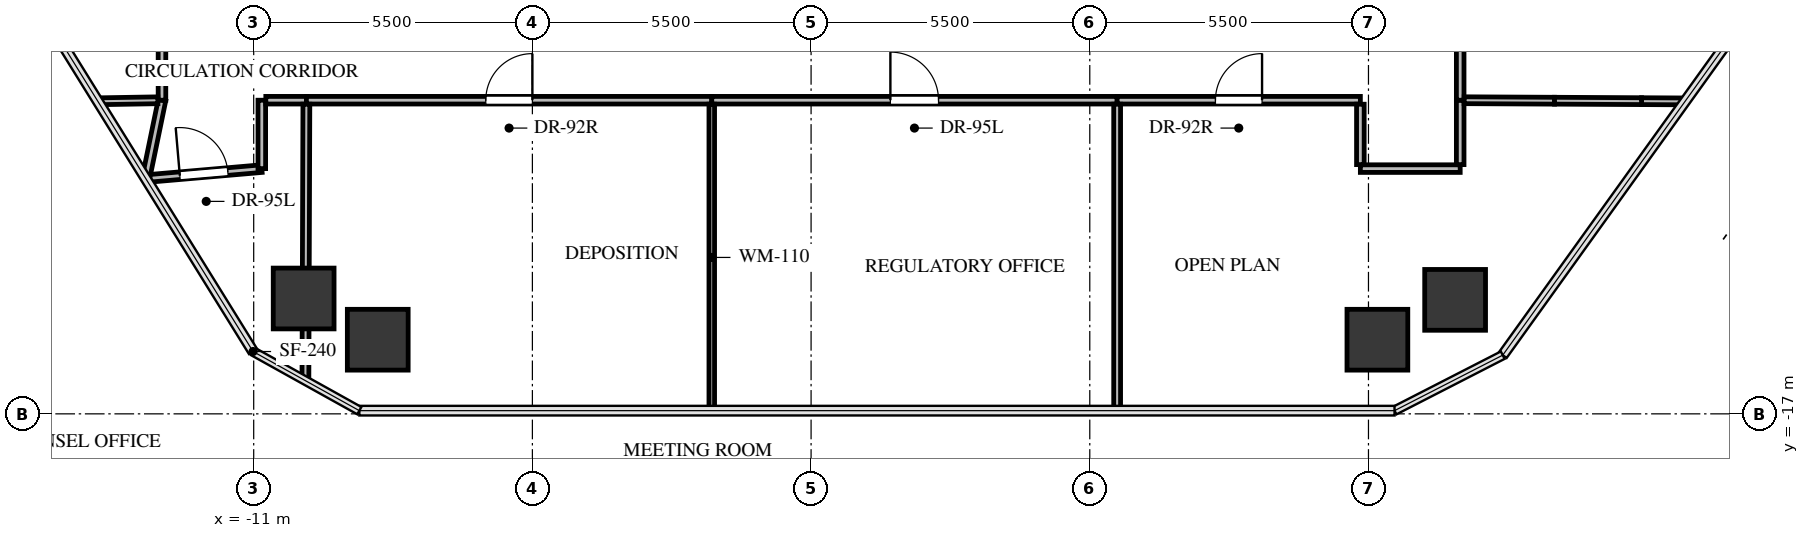
"""IFC4 building model, lengths in metres.
Left out: names, types, materials, properties, quantities, classifications, styles, units other than length and angle.
Written with IfcOpenShell. Run it as: python <this file> out.ifc"""

import sys

from ifc_helpers import new_model, si_unit, direction, frame, frame_2d, origin, origin_2d, place, context, subcontext, project, spatial, rectangle, extrude, source, transform, mapped, element, fill, save


model = new_model("IFC4")
c1 = context("Model", 3, precision=1e-05, world=origin(), true_north=direction((0.0, 1.0)))
c2 = subcontext(c1, "Body", "Model", "MODEL_VIEW")
j1 = project(units=[si_unit("LENGTHUNIT", "METRE"), si_unit("PLANEANGLEUNIT", "RADIAN")], contexts=[c1])
p1 = place(None, origin())
s1 = spatial("IfcSite", under=j1, at=p1, CompositionType="ELEMENT")
p2 = place(p1, origin())
s2 = spatial("IfcBuilding", under=s1, at=p2, CompositionType="ELEMENT")
p3 = place(p2, frame((0.0, 0.0, 146.1)))
s3 = spatial("IfcBuildingStorey", under=s2, at=p3, CompositionType="ELEMENT", Elevation=146.1)
m1 = source(origin(), c2, "Body", "SweptSolid", [
    extrude(rectangle(XDim=1.2, YDim=1.2, at=origin_2d()), origin(), (0.0, 0.0, 1.0), 4.12),
])
for number, where, z_axis, x_axis in (
    (1, (-10.014, -14.723, -0.24), (0.0, 0.0, 1.0), (1.0, 0.0, 0.0)),
    (2, (12.71, -14.75, -0.24), (0.0, 0.0, 1.0), (1.0, 0.0, 0.0)),
    (3, (11.176, -15.537, -0.24), (0.0, 0.0, 1.0), (1.0, 0.0, 0.0)),
    (4, (-8.552, -15.537, -0.24), (0.0, 0.0, 1.0), (1.0, 0.0, 0.0)),
):
    element("IfcColumn", number, at=place(p3, frame(where, z_axis=z_axis, x_axis=x_axis)), inside=s3, PredefinedType="COLUMN", context=c2, shape_type="MappedRepresentation", body=[
        mapped(m1, transform((0.0, 0.0, 0.0), x_axis=(1.0, 0.0, 0.0), y_axis=(0.0, 1.0, 0.0), z_axis=(0.0, 0.0, 1.0), scale=1.0)),
    ])
p4 = place(p3, frame((-13.129, -12.358, 0.0), z_axis=(0.0, 0.0, 1.0), x_axis=(0.996279168698, 0.086184789953, 0.0)))
e5 = element("IfcWall", 5, at=p4, inside=s3, PredefinedType="PARTITIONING", context=c2, shape_type="SweptSolid", body=[
    extrude(rectangle(XDim=2.297, YDim=0.15, at=frame_2d((1.149, 0.0))), origin(), (0.0, 0.0, 1.0), 2.3),
])
p5 = place(p4, frame((0.674, 0.0, 0.0)))
e6 = element("IfcOpeningElement", 6, at=p5, cuts=e5, PredefinedType="OPENING", context=c2, shape_type="SweptSolid", body=[
    extrude(rectangle(XDim=0.95, YDim=2.1, at=frame_2d((0.475, 1.05))), frame((0.0, 0.085, 0.0), z_axis=(0.0, -1.0, 0.0), x_axis=(1.0, 0.0, 0.0)), (0.0, 0.0, 1.0), 0.17),
])
p6 = place(p3, frame((-12.81, -10.81, 0.0), z_axis=(0.0, 0.0, 1.0), x_axis=(-0.201786289638, -0.979429575474, 0.0)))
e7 = element("IfcWall", 7, at=p6, inside=s3, PredefinedType="PARTITIONING", context=c2, shape_type="SweptSolid", body=[
    extrude(rectangle(XDim=1.498, YDim=0.15, at=frame_2d((0.749, 0.0))), origin(), (0.0, 0.0, 1.0), 2.3),
])
p7 = place(p3, frame((-10.84, -12.16, 0.0), z_axis=(0.0, 0.0, 1.0), x_axis=(0.0, 1.0, 0.0)))
e8 = element("IfcWall", 8, at=p7, inside=s3, PredefinedType="PARTITIONING", context=c2, shape_type="SweptSolid", body=[
    extrude(rectangle(XDim=1.35, YDim=0.15, at=frame_2d((0.675, 0.0))), origin(), (0.0, 0.0, 1.0), 3.865),
])
p8 = place(p3, frame((-10.761, -10.81, 0.0), z_axis=(0.0, 0.0, 1.0), x_axis=(1.0, 0.0, 0.0)))
e9 = element("IfcWall", 9, at=p8, inside=s3, PredefinedType="PARTITIONING", context=c2, shape_type="SweptSolid", body=[
    extrude(rectangle(XDim=0.801, YDim=0.15, at=frame_2d((0.4, 0.0))), origin(), (0.0, 0.0, 1.0), 3.865),
])
p9 = place(p3, frame((-9.96, -10.81, 0.0), z_axis=(0.0, 0.0, 1.0), x_axis=(1.0, 0.0, 0.0)))
e10 = element("IfcWall", 10, at=p9, inside=s3, PredefinedType="PARTITIONING", context=c2, shape_type="SweptSolid", body=[
    extrude(rectangle(XDim=8.0, YDim=0.15, at=frame_2d((4.0, 0.0))), origin(), (0.0, 0.0, 1.0), 2.3),
])
p10 = place(p9, frame((3.54, 0.0, 0.0)))
e11 = element("IfcOpeningElement", 11, at=p10, cuts=e10, PredefinedType="OPENING", context=c2, shape_type="SweptSolid", body=[
    extrude(rectangle(XDim=0.92, YDim=2.1, at=frame_2d((0.46, 1.05))), frame((0.0, 0.085, 0.0), z_axis=(0.0, -1.0, 0.0), x_axis=(1.0, 0.0, 0.0)), (0.0, 0.0, 1.0), 0.17),
])
p11 = place(p3, frame((-1.96, -10.81, 0.0), z_axis=(0.0, 0.0, 1.0), x_axis=(1.0, 0.0, 0.0)))
e12 = element("IfcWall", 12, at=p11, inside=s3, PredefinedType="PARTITIONING", context=c2, shape_type="SweptSolid", body=[
    extrude(rectangle(XDim=8.0, YDim=0.15, at=frame_2d((4.0, 0.0))), origin(), (0.0, 0.0, 1.0), 2.3),
])
p12 = place(p11, frame((3.525, 0.0, 0.0)))
e13 = element("IfcOpeningElement", 13, at=p12, cuts=e12, PredefinedType="OPENING", context=c2, shape_type="SweptSolid", body=[
    extrude(rectangle(XDim=0.95, YDim=2.1, at=frame_2d((0.475, 1.05))), frame((0.0, 0.085, 0.0), z_axis=(0.0, -1.0, 0.0), x_axis=(1.0, 0.0, 0.0)), (0.0, 0.0, 1.0), 0.17),
])
p13 = place(p3, frame((6.04, -10.81, 0.0), z_axis=(0.0, 0.0, 1.0), x_axis=(1.0, 0.0, 0.0)))
e14 = element("IfcWall", 14, at=p13, inside=s3, PredefinedType="PARTITIONING", context=c2, shape_type="SweptSolid", body=[
    extrude(rectangle(XDim=4.8, YDim=0.15, at=frame_2d((2.4, 0.0))), origin(), (0.0, 0.0, 1.0), 2.3),
])
p14 = place(p13, frame((1.94, 0.0, 0.0)))
e15 = element("IfcOpeningElement", 15, at=p14, cuts=e14, PredefinedType="OPENING", context=c2, shape_type="SweptSolid", body=[
    extrude(rectangle(XDim=0.92, YDim=2.1, at=frame_2d((0.46, 1.05))), frame((0.0, 0.085, 0.0), z_axis=(0.0, -1.0, 0.0), x_axis=(1.0, 0.0, 0.0)), (0.0, 0.0, 1.0), 0.17),
])
p15 = place(p3, frame((10.84, -12.16, 0.0), z_axis=(0.0, 0.0, 1.0), x_axis=(1.0, 0.0, 0.0)))
e16 = element("IfcWall", 16, at=p15, inside=s3, PredefinedType="PARTITIONING", context=c2, shape_type="SweptSolid", body=[
    extrude(rectangle(XDim=1.97, YDim=0.15, at=frame_2d((0.985, 0.0))), origin(), (0.0, 0.0, 1.0), 3.865),
])
p16 = place(p3, frame((10.84, -10.889, 0.0), z_axis=(0.0, 0.0, 1.0), x_axis=(0.0, -1.0, 0.0)))
e17 = element("IfcWall", 17, at=p16, inside=s3, PredefinedType="PARTITIONING", context=c2, shape_type="SweptSolid", body=[
    extrude(rectangle(XDim=1.192, YDim=0.15, at=frame_2d((0.596, 0.0))), origin(), (0.0, 0.0, 1.0), 3.865),
])
p17 = place(p3, frame((12.81, -12.081, 0.0), z_axis=(0.0, 0.0, 1.0), x_axis=(0.0, 1.0, 0.0)))
e18 = element("IfcWall", 18, at=p17, inside=s3, PredefinedType="PARTITIONING", context=c2, shape_type="SweptSolid", body=[
    extrude(rectangle(XDim=1.271, YDim=0.15, at=frame_2d((0.635, 0.0))), origin(), (0.0, 0.0, 1.0), 3.865),
])
p18 = place(p3, frame((-12.81, -3.96, 0.0), z_axis=(0.0, 0.0, 1.0), x_axis=(0.0, -1.0, 0.0)))
e19 = element("IfcWall", 19, at=p18, inside=s3, PredefinedType="PARTITIONING", context=c2, shape_type="SweptSolid", body=[
    extrude(rectangle(XDim=6.85, YDim=0.15, at=frame_2d((3.425, 0.0))), origin(), (0.0, 0.0, 1.0), 2.3),
])
p19 = place(p18, frame((2.95, 0.0, 0.0)))
e20 = element("IfcOpeningElement", 20, at=p19, cuts=e19, PredefinedType="OPENING", context=c2, shape_type="SweptSolid", body=[
    extrude(rectangle(XDim=0.95, YDim=2.1, at=frame_2d((0.475, 1.05))), frame((0.0, 0.085, 0.0), z_axis=(0.0, -1.0, 0.0), x_axis=(1.0, 0.0, 0.0)), (0.0, 0.0, 1.0), 0.17),
])
p20 = place(p3, frame((12.81, -10.81, 0.0), z_axis=(0.0, 0.0, 1.0), x_axis=(0.0, 1.0, 0.0)))
e21 = element("IfcWall", 21, at=p20, inside=s3, PredefinedType="PARTITIONING", context=c2, shape_type="SweptSolid", body=[
    extrude(rectangle(XDim=2.37, YDim=0.15, at=frame_2d((1.185, 0.0))), origin(), (0.0, 0.0, 1.0), 3.865),
])
p21 = place(p3, frame((-9.96, -10.889, 0.0), z_axis=(0.0, 0.0, 1.0), x_axis=(-0.003535128042, -0.999993751415, 0.0)))
e22 = element("IfcWall", 22, at=p21, inside=s3, PredefinedType="PARTITIONING", context=c2, shape_type="SweptSolid", body=[
    extrude(rectangle(XDim=5.456, YDim=0.135, at=frame_2d((2.728, 0.0))), origin(), (0.0, 0.0, 1.0), 2.3),
])
p22 = place(p3, frame((-14.076, -10.831, 0.0), z_axis=(0.0, 0.0, 1.0), x_axis=(0.999860796611, 0.016684945308, 0.0)))
e23 = element("IfcWall", 23, at=p22, inside=s3, PredefinedType="PARTITIONING", context=c2, shape_type="SweptSolid", body=[
    extrude(rectangle(XDim=1.185, YDim=0.135, at=frame_2d((0.593, 0.0))), origin(), (0.0, 0.0, 1.0), 2.3),
])
p23 = place(p3, frame((-1.96, -10.889, 0.0), z_axis=(0.0, 0.0, 1.0), x_axis=(0.0, -1.0, 0.0)))
e24 = element("IfcWall", 24, at=p23, inside=s3, PredefinedType="MOVABLE", context=c2, shape_type="SweptSolid", body=[
    extrude(rectangle(XDim=6.048, YDim=0.11, at=frame_2d((3.024, 0.0))), origin(), (0.0, 0.0, 1.0), 2.3),
])
p24 = place(p3, frame((6.04, -10.889, 0.0), z_axis=(0.0, 0.0, 1.0), x_axis=(0.0, -1.0, 0.0)))
e25 = element("IfcWall", 25, at=p24, inside=s3, PredefinedType="PARTITIONING", context=c2, shape_type="SweptSolid", body=[
    extrude(rectangle(XDim=6.048, YDim=0.135, at=frame_2d((3.024, 0.0))), origin(), (0.0, 0.0, 1.0), 2.3),
])
p25 = place(p3, frame((12.889, -10.81, 0.0), z_axis=(0.0, 0.0, 1.0), x_axis=(0.999985737151, -0.005340926287, 0.0)))
e26 = element("IfcWall", 26, at=p25, inside=s3, PredefinedType="PARTITIONING", context=c2, shape_type="SweptSolid", body=[
    extrude(rectangle(XDim=1.783, YDim=0.135, at=frame_2d((0.891, 0.0))), origin(), (0.0, 0.0, 1.0), 3.865),
])
p26 = place(p3, frame((16.389, -10.829, 0.0), z_axis=(0.0, 0.0, 1.0), x_axis=(0.999986910748, -0.005116476519, 0.0)))
e27 = element("IfcWall", 27, at=p26, inside=s3, PredefinedType="PARTITIONING", context=c2, shape_type="SweptSolid", body=[
    extrude(rectangle(XDim=0.859, YDim=0.135, at=frame_2d((0.429, 0.0))), origin(), (0.0, 0.0, 1.0), 3.865),
])
p27 = place(p3, frame((14.672, -10.82, 0.0), z_axis=(0.0, 0.0, 1.0), x_axis=(0.99998616562, -0.005260092142, 0.0)))
e28 = element("IfcWall", 28, at=p27, inside=s3, PredefinedType="PARTITIONING", context=c2, shape_type="SweptSolid", body=[
    extrude(rectangle(XDim=1.717, YDim=0.135, at=frame_2d((0.859, 0.0))), origin(), (0.0, 0.0, 1.0), 1.9),
])
m2 = source(origin(), c2, "Body", "SweptSolid", [
    extrude(rectangle(XDim=0.95, YDim=2.1, at=frame_2d((0.475, 1.05))), frame((0.0, 0.025, 0.0), z_axis=(0.0, -1.0, 0.0), x_axis=(1.0, 0.0, 0.0)), (0.0, 0.0, 1.0), 0.05),
])
p28 = place(p5, origin())
e29 = element("IfcDoor", 29, at=p28, inside=s3, OperationType="SINGLE_SWING_LEFT", PredefinedType="DOOR", context=c2, shape_type="MappedRepresentation", body=[
    mapped(m2, transform((0.0, 0.0, 0.0), x_axis=(1.0, 0.0, 0.0), y_axis=(0.0, 1.0, 0.0), z_axis=(0.0, 0.0, 1.0), scale=1.0)),
])
fill(e6, e29)
m3 = source(origin(), c2, "Body", "SweptSolid", [
    extrude(rectangle(XDim=0.92, YDim=2.1, at=frame_2d((0.46, 1.05))), frame((0.0, 0.025, 0.0), z_axis=(0.0, -1.0, 0.0), x_axis=(1.0, 0.0, 0.0)), (0.0, 0.0, 1.0), 0.05),
])
p29 = place(p10, origin())
e30 = element("IfcDoor", 30, at=p29, inside=s3, OperationType="SINGLE_SWING_RIGHT", PredefinedType="DOOR", context=c2, shape_type="MappedRepresentation", body=[
    mapped(m3, transform((0.0, 0.0, 0.0), x_axis=(1.0, 0.0, 0.0), y_axis=(0.0, 1.0, 0.0), z_axis=(0.0, 0.0, 1.0), scale=1.0)),
])
fill(e11, e30)
p30 = place(p12, origin())
e31 = element("IfcDoor", 31, at=p30, inside=s3, OperationType="SINGLE_SWING_LEFT", PredefinedType="DOOR", context=c2, shape_type="MappedRepresentation", body=[
    mapped(m2, transform((0.0, 0.0, 0.0), x_axis=(1.0, 0.0, 0.0), y_axis=(0.0, 1.0, 0.0), z_axis=(0.0, 0.0, 1.0), scale=1.0)),
])
fill(e13, e31)
p31 = place(p14, origin())
e32 = element("IfcDoor", 32, at=p31, inside=s3, OperationType="SINGLE_SWING_RIGHT", PredefinedType="DOOR", context=c2, shape_type="MappedRepresentation", body=[
    mapped(m3, transform((0.0, 0.0, 0.0), x_axis=(1.0, 0.0, 0.0), y_axis=(0.0, 1.0, 0.0), z_axis=(0.0, 0.0, 1.0), scale=1.0)),
])
fill(e15, e32)
save(model, sys.argv[1])
